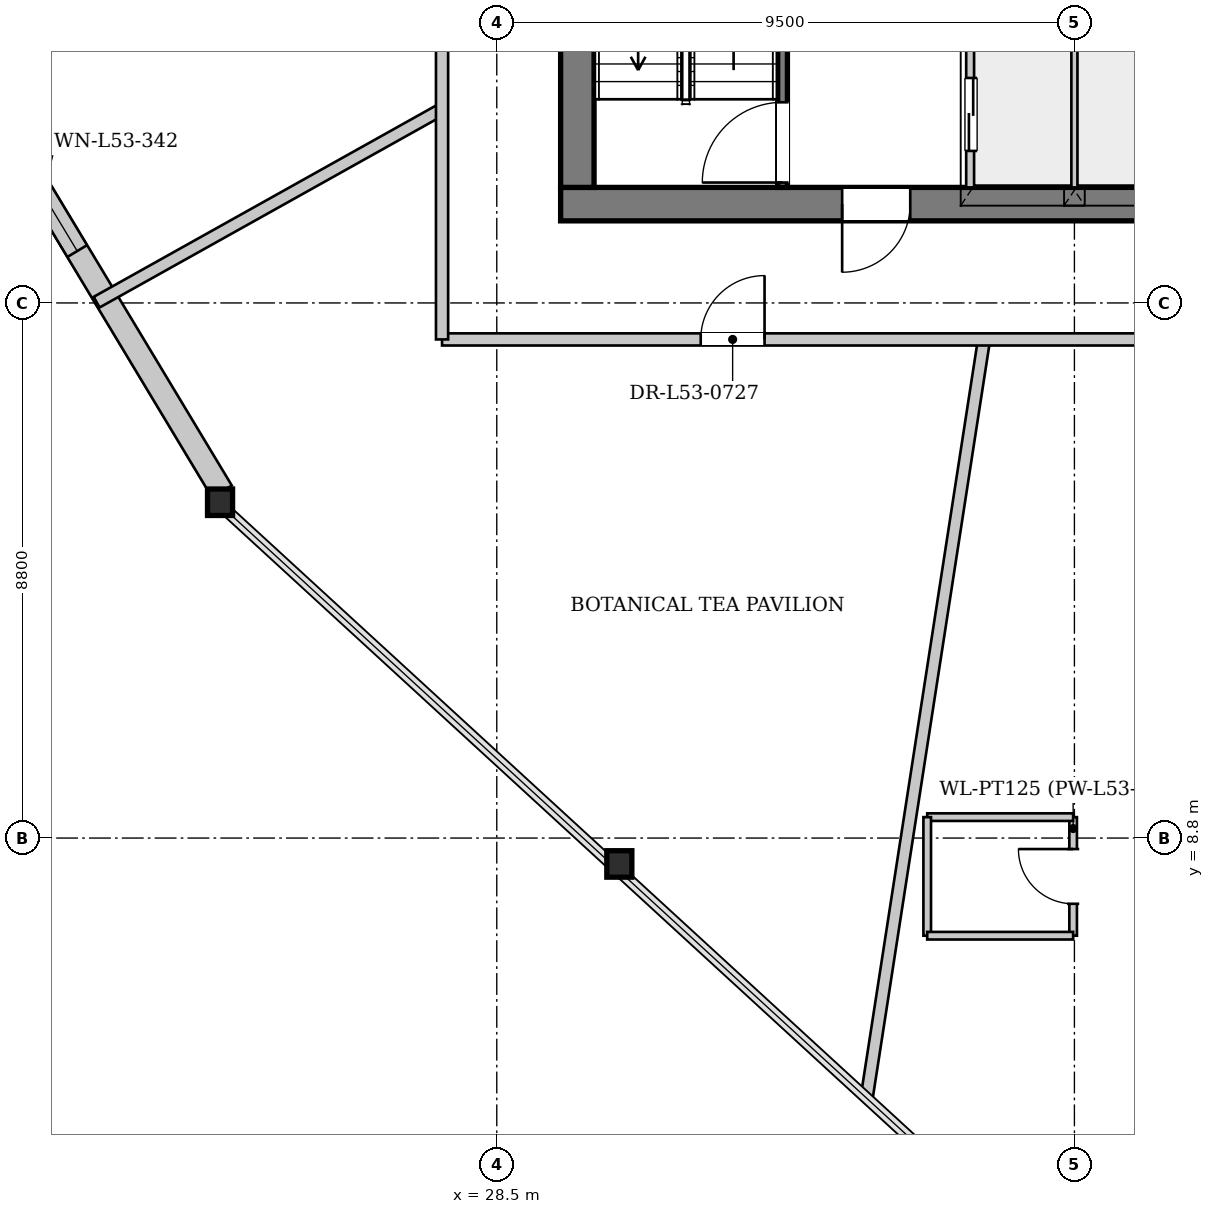
"""IFC4 building model, lengths in metres.
Left out: names, types, materials, properties, quantities, classifications, styles, units other than length and angle.
Written with IfcOpenShell. Run it as: python <this file> out.ifc"""

import sys

from ifc_helpers import new_model, si_unit, direction, frame, frame_2d, origin, origin_2d, place, context, subcontext, project, spatial, rectangle, i_section, extrude, source, transform, mapped, element, fill, save


model = new_model("IFC4")
c1 = context("Model", 3, precision=1e-05, world=origin(), true_north=direction((0.0, 1.0)))
c2 = subcontext(c1, "Body", "Model", "MODEL_VIEW")
j1 = project(units=[si_unit("LENGTHUNIT", "METRE"), si_unit("PLANEANGLEUNIT", "RADIAN")], contexts=[c1])
p1 = place(None, origin())
s1 = spatial("IfcSite", under=j1, at=p1, CompositionType="ELEMENT")
p2 = place(p1, origin())
s2 = spatial("IfcBuilding", under=s1, at=p2, CompositionType="ELEMENT")
p3 = place(p2, frame((0.0, 0.0, 200.3)))
s3 = spatial("IfcBuildingStorey", under=s2, at=p3, CompositionType="ELEMENT", Elevation=200.3)
m1 = source(origin(), c2, "Body", "SweptSolid", [
    extrude(i_section(OverallWidth=0.412, OverallDepth=0.435, WebThickness=0.031, FlangeThickness=0.05, at=origin_2d()), origin(), (0.0, 0.0, 1.0), 3.847),
])
p4 = place(p3, frame((23.816, 14.402, 0.0), z_axis=(0.068786554706, -0.041436919025, 0.99677048092), x_axis=(0.516005648237, 0.856585180229, 0.0)))
e1 = element("IfcColumn", 1, at=p4, inside=s3, PredefinedType="COLUMN", context=c2, shape_type="MappedRepresentation", body=[
    mapped(m1, transform((0.0, 0.0, 0.0), x_axis=(1.0, 0.0, 0.0), y_axis=(0.0, 1.0, 0.0), z_axis=(0.0, 0.0, 1.0), scale=1.0)),
])
m2 = source(origin(), c2, "Body", "SweptSolid", [
    extrude(i_section(OverallWidth=0.412, OverallDepth=0.435, WebThickness=0.031, FlangeThickness=0.05, at=origin_2d()), origin(), (0.0, 0.0, 1.0), 3.85),
])
p5 = place(p3, frame((30.348, 8.408, 0.0), z_axis=(0.08712489281, -0.01775470887, 0.996039167586), x_axis=(0.199680562852, 0.97986104771, 0.0)))
e2 = element("IfcColumn", 2, at=p5, inside=s3, PredefinedType="COLUMN", context=c2, shape_type="MappedRepresentation", body=[
    mapped(m2, transform((0.0, 0.0, 0.0), x_axis=(1.0, 0.0, 0.0), y_axis=(0.0, 1.0, 0.0), z_axis=(0.0, 0.0, 1.0), scale=1.0)),
])
p6 = place(p3, frame((23.979, 14.5, 0.0), z_axis=(0.0, 0.0, 1.0), x_axis=(-0.515702182495, 0.856767914298, 0.0)))
e3 = element("IfcWall", 3, at=p6, inside=s3, PredefinedType="SOLIDWALL", context=c2, shape_type="SweptSolid", body=[
    extrude(rectangle(XDim=17.729, YDim=0.38, at=frame_2d((8.865, 0.0))), origin(), (0.0, 0.0, 1.0), 2.972),
])
p7 = place(p6, frame((4.614, 0.0, 0.602)))
e4 = element("IfcOpeningElement", 4, at=p7, cuts=e3, PredefinedType="OPENING", context=c2, shape_type="SweptSolid", body=[
    extrude(rectangle(XDim=2.2, YDim=2.25, at=frame_2d((1.1, 1.125))), frame((0.0, 0.2, 0.0), z_axis=(0.0, -1.0, 0.0), x_axis=(1.0, 0.0, 0.0)), (0.0, 0.0, 1.0), 0.4),
])
p8 = place(p6, frame((11.665, 0.0, 0.602)))
e5 = element("IfcOpeningElement", 5, at=p8, cuts=e3, PredefinedType="OPENING", context=c2, shape_type="SweptSolid", body=[
    extrude(rectangle(XDim=2.2, YDim=2.25, at=frame_2d((1.1, 1.125))), frame((0.0, 0.2, 0.0), z_axis=(0.0, -1.0, 0.0), x_axis=(1.0, 0.0, 0.0)), (0.0, 0.0, 1.0), 0.4),
])
p9 = place(p3, frame((46.45, 19.225, 0.0), z_axis=(0.0, 0.0, 1.0), x_axis=(-1.0, 0.0, 0.0)))
e6 = element("IfcWall", 6, at=p9, inside=s3, PredefinedType="SHEAR", context=c2, shape_type="SweptSolid", body=[
    extrude(rectangle(XDim=16.9, YDim=0.55, at=frame_2d((8.45, 0.0))), origin(), (0.0, 0.0, 1.0), 3.58),
])
p10 = place(p9, frame((4.65, 0.0, 0.0)))
e7 = element("IfcOpeningElement", 7, at=p10, cuts=e6, PredefinedType="OPENING", context=c2, shape_type="SweptSolid", body=[
    extrude(rectangle(XDim=1.12, YDim=2.25, at=frame_2d((0.56, 1.125))), frame((0.0, 0.285, 0.0), z_axis=(0.0, -1.0, 0.0), x_axis=(1.0, 0.0, 0.0)), (0.0, 0.0, 1.0), 0.57),
])
p11 = place(p9, frame((11.15, 0.0, 0.0)))
e8 = element("IfcOpeningElement", 8, at=p11, cuts=e6, PredefinedType="OPENING", context=c2, shape_type="SweptSolid", body=[
    extrude(rectangle(XDim=1.12, YDim=2.25, at=frame_2d((0.56, 1.125))), frame((0.0, 0.285, 0.0), z_axis=(0.0, -1.0, 0.0), x_axis=(1.0, 0.0, 0.0)), (0.0, 0.0, 1.0), 0.57),
])
p12 = place(p3, frame((29.825, 19.5, 0.0), z_axis=(0.0, 0.0, 1.0), x_axis=(0.0, 1.0, 0.0)))
e9 = element("IfcWall", 9, at=p12, inside=s3, PredefinedType="SHEAR", context=c2, shape_type="SweptSolid", body=[
    extrude(rectangle(XDim=14.2, YDim=0.55, at=frame_2d((7.1, 0.0))), origin(), (0.0, 0.0, 1.0), 3.58),
])
p13 = place(p12, frame((7.42, 0.0, 0.0)))
e10 = element("IfcOpeningElement", 10, at=p13, cuts=e9, PredefinedType="OPENING", context=c2, shape_type="SweptSolid", body=[
    extrude(rectangle(XDim=1.6, YDim=2.2, at=frame_2d((0.8, 1.1))), frame((0.0, 0.285, 0.0), z_axis=(0.0, -1.0, 0.0), x_axis=(1.0, 0.0, 0.0)), (0.0, 0.0, 1.0), 0.57),
])
p14 = place(p3, frame((33.2, 19.5, 0.0), z_axis=(0.0, 0.0, 1.0), x_axis=(0.0, 1.0, 0.0)))
e11 = element("IfcWall", 11, at=p14, inside=s3, PredefinedType="PARTITIONING", context=c2, shape_type="SweptSolid", body=[
    extrude(rectangle(XDim=7.46, YDim=0.16, at=frame_2d((3.73, 0.0))), origin(), (0.0, 0.0, 1.0), 3.58),
])
p15 = place(p14, frame((0.08, 0.0, 0.0)))
e12 = element("IfcOpeningElement", 12, at=p15, cuts=e11, PredefinedType="OPENING", context=c2, shape_type="SweptSolid", body=[
    extrude(rectangle(XDim=1.32, YDim=2.2, at=frame_2d((0.66, 1.1))), frame((0.0, 0.09, 0.0), z_axis=(0.0, -1.0, 0.0), x_axis=(1.0, 0.0, 0.0)), (0.0, 0.0, 1.0), 0.18),
])
p16 = place(p3, frame((36.3, 19.5, 0.0), z_axis=(0.0, 0.0, 1.0), x_axis=(0.0, 1.0, 0.0)))
e13 = element("IfcWall", 13, at=p16, inside=s3, PredefinedType="PARTITIONING", context=c2, shape_type="SweptSolid", body=[
    extrude(rectangle(XDim=4.78, YDim=0.16, at=frame_2d((2.39, 0.0))), origin(), (0.0, 0.0, 1.0), 3.58),
])
p17 = place(p16, frame((0.6, 0.0, 0.0)))
e14 = element("IfcOpeningElement", 14, at=p17, cuts=e13, PredefinedType="OPENING", context=c2, shape_type="SweptSolid", body=[
    extrude(rectangle(XDim=1.2, YDim=2.2, at=frame_2d((0.6, 1.1))), frame((0.0, 0.09, 0.0), z_axis=(0.0, -1.0, 0.0), x_axis=(1.0, 0.0, 0.0)), (0.0, 0.0, 1.0), 0.18),
])
p18 = place(p16, frame((2.65, 0.0, 0.0)))
e15 = element("IfcOpeningElement", 15, at=p18, cuts=e13, PredefinedType="OPENING", context=c2, shape_type="SweptSolid", body=[
    extrude(rectangle(XDim=0.95, YDim=2.1, at=frame_2d((0.475, 1.05))), frame((0.0, 0.09, 0.0), z_axis=(0.0, -1.0, 0.0), x_axis=(1.0, 0.0, 0.0)), (0.0, 0.0, 1.0), 0.18),
])
p19 = place(p3, frame((38.0, 19.5, 0.0), z_axis=(0.0, 0.0, 1.0), x_axis=(0.0, 1.0, 0.0)))
e16 = element("IfcWall", 16, at=p19, inside=s3, PredefinedType="PARTITIONING", context=c2, shape_type="SweptSolid", body=[
    extrude(rectangle(XDim=2.46, YDim=0.125, at=frame_2d((1.23, 0.0))), origin(), (0.0, 0.0, 1.0), 3.58),
])
p20 = place(p3, frame((27.6, 20.788, 0.0), z_axis=(0.0, 0.0, 1.0), x_axis=(-0.872931735327, -0.487842377678, 0.0)))
e17 = element("IfcWall", 17, at=p20, inside=s3, PredefinedType="PARTITIONING", context=c2, shape_type="SweptSolid", body=[
    extrude(rectangle(XDim=6.508, YDim=0.2, at=frame_2d((3.254, 0.0))), origin(), (0.0, 0.0, 1.0), 3.58),
])
p21 = place(p3, frame((36.514, 17.0, 0.0), z_axis=(0.0, 0.0, 1.0), x_axis=(-0.152982434714, -0.988228908031, 0.0)))
e18 = element("IfcWall", 18, at=p21, inside=s3, PredefinedType="PARTITIONING", context=c2, shape_type="SweptSolid", body=[
    extrude(rectangle(XDim=12.59, YDim=0.2, at=frame_2d((6.295, 0.0))), origin(), (0.0, 0.0, 1.0), 3.58),
])
p22 = place(p3, frame((37.979, 7.194, 0.0), z_axis=(0.0, 0.0, 1.0), x_axis=(0.0, 1.0, 0.0)))
e19 = element("IfcWall", 19, at=p22, inside=s3, PredefinedType="PARTITIONING", context=c2, shape_type="SweptSolid", body=[
    extrude(rectangle(XDim=1.95, YDim=0.125, at=frame_2d((0.975, 0.0))), origin(), (0.0, 0.0, 1.0), 3.58),
])
p23 = place(p22, frame((0.525, 0.0, 0.0)))
e20 = element("IfcOpeningElement", 20, at=p23, cuts=e19, PredefinedType="OPENING", context=c2, shape_type="SweptSolid", body=[
    extrude(rectangle(XDim=0.9, YDim=2.1, at=frame_2d((0.45, 1.05))), frame((0.0, 0.073, 0.0), z_axis=(0.0, -1.0, 0.0), x_axis=(1.0, 0.0, 0.0)), (0.0, 0.0, 1.0), 0.145),
])
p24 = place(p3, frame((37.979, 9.144, 0.0), z_axis=(0.0, 0.0, 1.0), x_axis=(-1.0, 0.0, 0.0)))
e21 = element("IfcWall", 21, at=p24, inside=s3, PredefinedType="PARTITIONING", context=c2, shape_type="SweptSolid", body=[
    extrude(rectangle(XDim=2.4, YDim=0.125, at=frame_2d((1.2, 0.0))), origin(), (0.0, 0.0, 1.0), 3.58),
])
p25 = place(p3, frame((35.579, 9.144, 0.0), z_axis=(0.0, 0.0, 1.0), x_axis=(0.0, -1.0, 0.0)))
e22 = element("IfcWall", 22, at=p25, inside=s3, PredefinedType="PARTITIONING", context=c2, shape_type="SweptSolid", body=[
    extrude(rectangle(XDim=1.95, YDim=0.125, at=frame_2d((0.975, 0.0))), origin(), (0.0, 0.0, 1.0), 3.58),
])
p26 = place(p3, frame((35.579, 7.194, 0.0), z_axis=(0.0, 0.0, 1.0), x_axis=(1.0, 0.0, 0.0)))
e23 = element("IfcWall", 23, at=p26, inside=s3, PredefinedType="PARTITIONING", context=c2, shape_type="SweptSolid", body=[
    extrude(rectangle(XDim=2.4, YDim=0.125, at=frame_2d((1.2, 0.0))), origin(), (0.0, 0.0, 1.0), 3.58),
])
p27 = place(p3, frame((27.6, 17.0, 0.0), z_axis=(0.0, 0.0, 1.0), x_axis=(1.0, 0.0, 0.0)))
e24 = element("IfcWall", 24, at=p27, inside=s3, PredefinedType="PARTITIONING", context=c2, shape_type="SweptSolid", body=[
    extrude(rectangle(XDim=20.8, YDim=0.2, at=frame_2d((10.4, 0.0))), origin(), (0.0, 0.0, 1.0), 3.58),
])
p28 = place(p27, frame((4.254, 0.0, 0.0)))
e25 = element("IfcOpeningElement", 25, at=p28, cuts=e24, PredefinedType="OPENING", context=c2, shape_type="SweptSolid", body=[
    extrude(rectangle(XDim=1.05, YDim=2.2, at=frame_2d((0.525, 1.1))), frame((0.0, 0.11, 0.0), z_axis=(0.0, -1.0, 0.0), x_axis=(1.0, 0.0, 0.0)), (0.0, 0.0, 1.0), 0.22),
])
p29 = place(p27, frame((12.791, 0.0, 0.0)))
e26 = element("IfcOpeningElement", 26, at=p29, cuts=e24, PredefinedType="OPENING", context=c2, shape_type="SweptSolid", body=[
    extrude(rectangle(XDim=1.05, YDim=2.2, at=frame_2d((0.525, 1.1))), frame((0.0, 0.11, 0.0), z_axis=(0.0, -1.0, 0.0), x_axis=(1.0, 0.0, 0.0)), (0.0, 0.0, 1.0), 0.22),
])
p30 = place(p3, frame((27.6, 17.0, 0.0), z_axis=(0.0, 0.0, 1.0), x_axis=(0.0, 1.0, 0.0)))
e27 = element("IfcWall", 27, at=p30, inside=s3, PredefinedType="PARTITIONING", context=c2, shape_type="SweptSolid", body=[
    extrude(rectangle(XDim=19.2, YDim=0.2, at=frame_2d((9.6, 0.0))), origin(), (0.0, 0.0, 1.0), 3.58),
])
p31 = place(p30, frame((15.813, 0.0, 0.0)))
e28 = element("IfcOpeningElement", 28, at=p31, cuts=e27, PredefinedType="OPENING", context=c2, shape_type="SweptSolid", body=[
    extrude(rectangle(XDim=1.6, YDim=2.2, at=frame_2d((0.8, 1.1))), frame((0.0, 0.11, 0.0), z_axis=(0.0, -1.0, 0.0), x_axis=(1.0, 0.0, 0.0)), (0.0, 0.0, 1.0), 0.22),
])
p32 = place(p30, frame((7.66, 0.0, 0.0)))
e29 = element("IfcOpeningElement", 29, at=p32, cuts=e27, PredefinedType="OPENING", context=c2, shape_type="SweptSolid", body=[
    extrude(rectangle(XDim=1.05, YDim=2.2, at=frame_2d((0.525, 1.1))), frame((0.0, 0.11, 0.0), z_axis=(0.0, -1.0, 0.0), x_axis=(1.0, 0.0, 0.0)), (0.0, 0.0, 1.0), 0.22),
])
m3 = source(origin(), c2, "Body", "SweptSolid", [
    extrude(rectangle(XDim=2.2, YDim=2.25, at=frame_2d((1.1, 1.125))), frame((0.0, 0.03, 0.0), z_axis=(0.0, -1.0, 0.0), x_axis=(1.0, 0.0, 0.0)), (0.0, 0.0, 1.0), 0.06),
])
p33 = place(p7, origin())
e30 = element("IfcWindow", 30, at=p33, inside=s3, PartitioningType="SINGLE_PANEL", PredefinedType="WINDOW", context=c2, shape_type="MappedRepresentation", body=[
    mapped(m3, transform((0.0, 0.0, 0.0), x_axis=(1.0, 0.0, 0.0), y_axis=(0.0, 1.0, 0.0), z_axis=(0.0, 0.0, 1.0), scale=1.0)),
])
fill(e4, e30)
m4 = source(origin(), c2, "Body", "SweptSolid", [
    extrude(rectangle(XDim=1.12, YDim=2.25, at=frame_2d((0.56, 1.125))), frame((0.0, 0.025, 0.0), z_axis=(0.0, -1.0, 0.0), x_axis=(1.0, 0.0, 0.0)), (0.0, 0.0, 1.0), 0.05),
])
p34 = place(p11, origin())
e31 = element("IfcDoor", 31, at=p34, inside=s3, OperationType="SINGLE_SWING_RIGHT", PredefinedType="DOOR", context=c2, shape_type="MappedRepresentation", body=[
    mapped(m4, transform((0.0, 0.0, 0.0), x_axis=(1.0, 0.0, 0.0), y_axis=(0.0, 1.0, 0.0), z_axis=(0.0, 0.0, 1.0), scale=1.0)),
])
fill(e8, e31)
m5 = source(origin(), c2, "Body", "SweptSolid", [
    extrude(rectangle(XDim=1.32, YDim=2.2, at=frame_2d((0.66, 1.1))), frame((0.0, 0.025, 0.0), z_axis=(0.0, -1.0, 0.0), x_axis=(1.0, 0.0, 0.0)), (0.0, 0.0, 1.0), 0.05),
])
p35 = place(p15, origin())
e32 = element("IfcDoor", 32, at=p35, inside=s3, OperationType="SINGLE_SWING_LEFT", PredefinedType="DOOR", context=c2, shape_type="MappedRepresentation", body=[
    mapped(m5, transform((0.0, 0.0, 0.0), x_axis=(1.0, 0.0, 0.0), y_axis=(0.0, 1.0, 0.0), z_axis=(0.0, 0.0, 1.0), scale=1.0)),
])
fill(e12, e32)
m6 = source(origin(), c2, "Body", "SweptSolid", [
    extrude(rectangle(XDim=1.2, YDim=2.2, at=frame_2d((0.6, 1.1))), frame((0.0, 0.025, 0.0), z_axis=(0.0, -1.0, 0.0), x_axis=(1.0, 0.0, 0.0)), (0.0, 0.0, 1.0), 0.05),
])
p36 = place(p17, origin())
e33 = element("IfcDoor", 33, at=p36, inside=s3, OperationType="DOUBLE_DOOR_SLIDING", PredefinedType="DOOR", context=c2, shape_type="MappedRepresentation", body=[
    mapped(m6, transform((0.0, 0.0, 0.0), x_axis=(1.0, 0.0, 0.0), y_axis=(0.0, 1.0, 0.0), z_axis=(0.0, 0.0, 1.0), scale=1.0)),
])
fill(e14, e33)
m7 = source(origin(), c2, "Body", "SweptSolid", [
    extrude(rectangle(XDim=0.9, YDim=2.1, at=frame_2d((0.45, 1.05))), frame((0.0, 0.025, 0.0), z_axis=(0.0, -1.0, 0.0), x_axis=(1.0, 0.0, 0.0)), (0.0, 0.0, 1.0), 0.05),
])
p37 = place(p23, origin())
e34 = element("IfcDoor", 34, at=p37, inside=s3, OperationType="SINGLE_SWING_RIGHT", PredefinedType="DOOR", context=c2, shape_type="MappedRepresentation", body=[
    mapped(m7, transform((0.0, 0.0, 0.0), x_axis=(1.0, 0.0, 0.0), y_axis=(0.0, 1.0, 0.0), z_axis=(0.0, 0.0, 1.0), scale=1.0)),
])
fill(e20, e34)
m8 = source(origin(), c2, "Body", "SweptSolid", [
    extrude(rectangle(XDim=1.05, YDim=2.2, at=frame_2d((0.525, 1.1))), frame((0.0, 0.025, 0.0), z_axis=(0.0, -1.0, 0.0), x_axis=(1.0, 0.0, 0.0)), (0.0, 0.0, 1.0), 0.05),
])
p38 = place(p28, origin())
e35 = element("IfcDoor", 35, at=p38, inside=s3, OperationType="SINGLE_SWING_RIGHT", PredefinedType="DOOR", context=c2, shape_type="MappedRepresentation", body=[
    mapped(m8, transform((0.0, 0.0, 0.0), x_axis=(1.0, 0.0, 0.0), y_axis=(0.0, 1.0, 0.0), z_axis=(0.0, 0.0, 1.0), scale=1.0)),
])
fill(e25, e35)
save(model, sys.argv[1])
